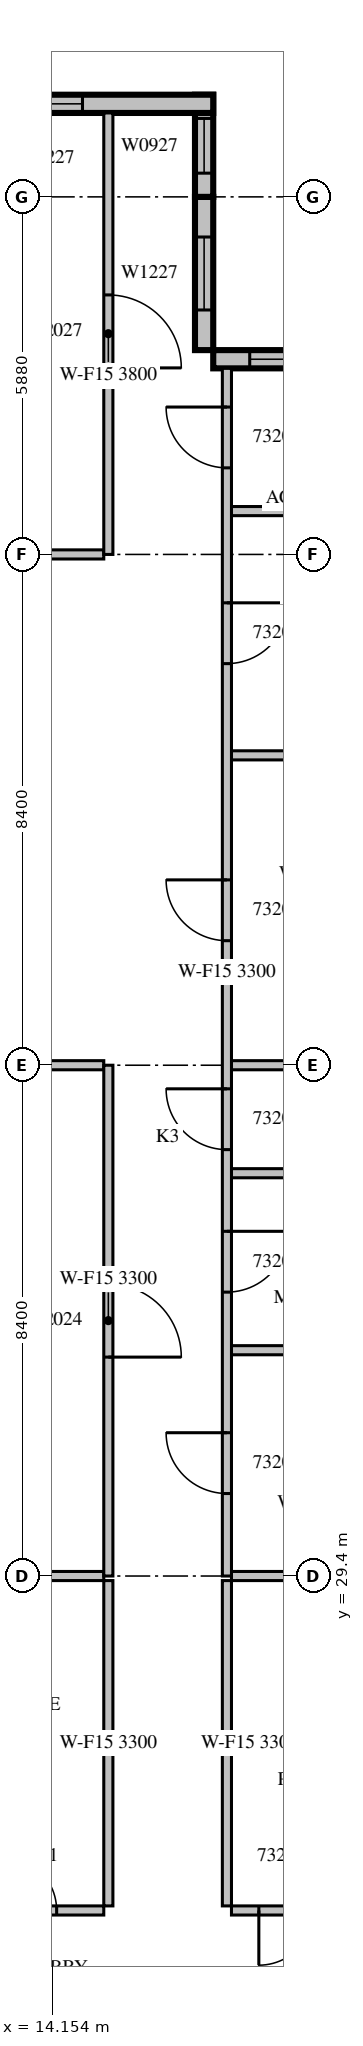
"""IFC4 building model, lengths in metres.
Left out: names, types, materials, properties, quantities, classifications, styles, units other than length and angle.
Written with IfcOpenShell. Run it as: python <this file> out.ifc"""

import sys

from ifc_helpers import new_model, si_unit, direction, frame, frame_2d, origin, place, context, subcontext, project, spatial, rectangle, extrude, source, transform, mapped, element, fill, save


model = new_model("IFC4")
c1 = context("Model", 3, precision=1e-05, world=origin(), true_north=direction((0.0, 1.0)))
c2 = subcontext(c1, "Body", "Model", "MODEL_VIEW")
j1 = project(units=[si_unit("LENGTHUNIT", "METRE"), si_unit("PLANEANGLEUNIT", "RADIAN")], contexts=[c1])
p1 = place(None, origin())
s1 = spatial("IfcSite", under=j1, at=p1, CompositionType="ELEMENT")
p2 = place(p1, origin())
s2 = spatial("IfcBuilding", under=s1, at=p2, CompositionType="ELEMENT")
p3 = place(p2, frame((0.0, 0.0, 145.5)))
s3 = spatial("IfcBuildingStorey", under=s2, at=p3, CompositionType="ELEMENT", Elevation=145.5)
m1 = source(origin(), c2, "Body", "SweptSolid", [
    extrude(rectangle(XDim=4.2, YDim=0.3, at=frame_2d((2.1, 0.0))), origin(), (0.0, 0.0, 1.0), 3.8),
])
p4 = place(p3, frame((21.0, 49.41, 0.0), z_axis=(0.0, 0.0, 1.0), x_axis=(-1.0, 0.0, 0.0)))
e1 = element("IfcWall", 1, at=p4, inside=s3, PredefinedType="STANDARD", context=c2, shape_type="MappedRepresentation", body=[
    mapped(m1, transform((0.0, 0.0, 0.0), scale=1.0)),
])
m2 = source(origin(), c2, "Body", "SweptSolid", [
    extrude(rectangle(XDim=3.0, YDim=2.7, at=frame_2d((1.5, 1.35))), frame((0.0, 0.16, 0.0), z_axis=(0.0, -1.0, 0.0), x_axis=(1.0, 0.0, 0.0)), (0.0, 0.0, 1.0), 0.32),
])
p5 = place(p4, frame((0.6, 0.0, 0.6)))
e2 = element("IfcOpeningElement", 2, at=p5, cuts=e1, PredefinedType="OPENING", context=c2, shape_type="MappedRepresentation", body=[
    mapped(m2, transform((0.0, 0.0, 0.0), scale=1.0)),
])
m3 = source(origin(), c2, "Body", "SweptSolid", [
    extrude(rectangle(XDim=2.52, YDim=0.3, at=frame_2d((1.26, 0.0))), origin(), (0.0, 0.0, 1.0), 3.8),
])
p6 = place(p3, frame((16.65, 49.56, 0.0), z_axis=(0.0, 0.0, 1.0), x_axis=(0.0, 1.0, 0.0)))
e3 = element("IfcWall", 3, at=p6, inside=s3, PredefinedType="STANDARD", context=c2, shape_type="MappedRepresentation", body=[
    mapped(m3, transform((0.0, 0.0, 0.0), scale=1.0)),
])
m4 = source(origin(), c2, "Body", "SweptSolid", [
    extrude(rectangle(XDim=1.2, YDim=2.7, at=frame_2d((0.6, 1.35))), frame((0.0, 0.16, 0.0), z_axis=(0.0, -1.0, 0.0), x_axis=(1.0, 0.0, 0.0)), (0.0, 0.0, 1.0), 0.32),
])
p7 = place(p6, frame((0.66, 0.0, 0.6)))
e4 = element("IfcOpeningElement", 4, at=p7, cuts=e3, PredefinedType="OPENING", context=c2, shape_type="MappedRepresentation", body=[
    mapped(m4, transform((0.0, 0.0, 0.0), scale=1.0)),
])
m5 = source(origin(), c2, "Body", "SweptSolid", [
    extrude(rectangle(XDim=1.68, YDim=0.3, at=frame_2d((0.84, 0.0))), origin(), (0.0, 0.0, 1.0), 3.8),
])
p8 = place(p3, frame((16.65, 52.08, 0.0), z_axis=(0.0, 0.0, 1.0), x_axis=(0.0, 1.0, 0.0)))
e5 = element("IfcWall", 5, at=p8, inside=s3, PredefinedType="STANDARD", context=c2, shape_type="MappedRepresentation", body=[
    mapped(m5, transform((0.0, 0.0, 0.0), scale=1.0)),
])
m6 = source(origin(), c2, "Body", "SweptSolid", [
    extrude(rectangle(XDim=0.9, YDim=2.7, at=frame_2d((0.45, 1.35))), frame((0.0, 0.16, 0.0), z_axis=(0.0, -1.0, 0.0), x_axis=(1.0, 0.0, 0.0)), (0.0, 0.0, 1.0), 0.32),
])
p9 = place(p8, frame((0.39, 0.0, 0.6)))
e6 = element("IfcOpeningElement", 6, at=p9, cuts=e5, PredefinedType="OPENING", context=c2, shape_type="MappedRepresentation", body=[
    mapped(m6, transform((0.0, 0.0, 0.0), scale=1.0)),
])
m7 = source(origin(), c2, "Body", "SweptSolid", [
    extrude(rectangle(XDim=10.5, YDim=0.3, at=frame_2d((5.25, 0.0))), origin(), (0.0, 0.0, 1.0), 3.8),
])
p10 = place(p3, frame((16.8, 53.61, 0.0), z_axis=(0.0, 0.0, 1.0), x_axis=(-1.0, 0.0, 0.0)))
e7 = element("IfcWall", 7, at=p10, inside=s3, PredefinedType="STANDARD", context=c2, shape_type="MappedRepresentation", body=[
    mapped(m7, transform((0.0, 0.0, 0.0), scale=1.0)),
])
p11 = place(p10, frame((2.15, 0.0, 0.6)))
e8 = element("IfcOpeningElement", 8, at=p11, cuts=e7, PredefinedType="OPENING", context=c2, shape_type="MappedRepresentation", body=[
    mapped(m4, transform((0.0, 0.0, 0.0), scale=1.0)),
])
m8 = source(origin(), c2, "Body", "SweptSolid", [
    extrude(rectangle(XDim=1.8, YDim=2.7, at=frame_2d((0.9, 1.35))), frame((0.0, 0.16, 0.0), z_axis=(0.0, -1.0, 0.0), x_axis=(1.0, 0.0, 0.0)), (0.0, 0.0, 1.0), 0.32),
])
p12 = place(p10, frame((8.025, 0.0, 0.6)))
e9 = element("IfcOpeningElement", 9, at=p12, cuts=e7, PredefinedType="OPENING", context=c2, shape_type="MappedRepresentation", body=[
    mapped(m8, transform((0.0, 0.0, 0.0), scale=1.0)),
])
m9 = source(origin(), c2, "Body", "SweptSolid", [
    extrude(rectangle(XDim=8.495, YDim=0.15, at=frame_2d((4.247, 0.0))), origin(), (0.0, 0.0, 1.0), 2.8),
])
p13 = place(p3, frame((6.505, 23.9, 0.0), z_axis=(0.0, 0.0, 1.0), x_axis=(1.0, 0.0, 0.0)))
e10 = element("IfcWall", 10, at=p13, inside=s3, PredefinedType="PARTITIONING", context=c2, shape_type="MappedRepresentation", body=[
    mapped(m9, transform((0.0, 0.0, 0.0), scale=1.0)),
])
m10 = source(origin(), c2, "Body", "SweptSolid", [
    extrude(rectangle(XDim=0.9, YDim=2.1, at=frame_2d((0.45, 1.05))), frame((0.0, 0.085, 0.0), z_axis=(0.0, -1.0, 0.0), x_axis=(1.0, 0.0, 0.0)), (0.0, 0.0, 1.0), 0.17),
])
p14 = place(p13, frame((1.745, 0.0, 0.0)))
e11 = element("IfcOpeningElement", 11, at=p14, cuts=e10, PredefinedType="OPENING", context=c2, shape_type="MappedRepresentation", body=[
    mapped(m10, transform((0.0, 0.0, 0.0), scale=1.0)),
])
p15 = place(p13, frame((6.82, 0.0, 0.0)))
e12 = element("IfcOpeningElement", 12, at=p15, cuts=e10, PredefinedType="OPENING", context=c2, shape_type="MappedRepresentation", body=[
    mapped(m10, transform((0.0, 0.0, 0.0), scale=1.0)),
])
m11 = source(origin(), c2, "Body", "SweptSolid", [
    extrude(rectangle(XDim=3.6, YDim=0.15, at=frame_2d((1.8, 0.0))), origin(), (0.0, 0.0, 1.0), 2.8),
])
p16 = place(p3, frame((17.1, 23.9, 0.0), z_axis=(0.0, 0.0, 1.0), x_axis=(1.0, 0.0, 0.0)))
e13 = element("IfcWall", 13, at=p16, inside=s3, PredefinedType="PARTITIONING", context=c2, shape_type="MappedRepresentation", body=[
    mapped(m11, transform((0.0, 0.0, 0.0), scale=1.0)),
])
p17 = place(p16, frame((0.45, 0.0, 0.0)))
e14 = element("IfcOpeningElement", 14, at=p17, cuts=e13, PredefinedType="OPENING", context=c2, shape_type="MappedRepresentation", body=[
    mapped(m10, transform((0.0, 0.0, 0.0), scale=1.0)),
])
m12 = source(origin(), c2, "Body", "SweptSolid", [
    extrude(rectangle(XDim=5.35, YDim=0.15, at=frame_2d((2.675, 0.0))), origin(), (0.0, 0.0, 1.0), 3.3),
])
for number, where, z_axis, x_axis in (
    (15, (15.075, 23.975, 0.0), (0.0, 0.0, 1.0), (0.0, 1.0, 0.0)),
    (16, (17.025, 29.325, 0.0), (0.0, 0.0, 1.0), (0.0, -1.0, 0.0)),
):
    element("IfcWall", number, at=place(p3, frame(where, z_axis=z_axis, x_axis=x_axis)), inside=s3, PredefinedType="PARTITIONING", context=c2, shape_type="MappedRepresentation", body=[
        mapped(m12, transform((0.0, 0.0, 0.0), scale=1.0)),
    ])
m13 = source(origin(), c2, "Body", "SweptSolid", [
    extrude(rectangle(XDim=3.976, YDim=0.15, at=frame_2d((1.988, 0.0))), origin(), (0.0, 0.0, 1.0), 3.8),
])
p18 = place(p3, frame((15.0, 29.4, 0.0), z_axis=(0.0, 0.0, 1.0), x_axis=(-1.0, 0.0, 0.0)))
e17 = element("IfcWall", 17, at=p18, inside=s3, PredefinedType="PARTITIONING", context=c2, shape_type="MappedRepresentation", body=[
    mapped(m13, transform((0.0, 0.0, 0.0), scale=1.0)),
])
m14 = source(origin(), c2, "Body", "SweptSolid", [
    extrude(rectangle(XDim=2.851, YDim=0.15, at=frame_2d((1.425, 0.0))), origin(), (0.0, 0.0, 1.0), 3.8),
])
p19 = place(p3, frame((19.951, 29.4, 0.0), z_axis=(0.0, 0.0, 1.0), x_axis=(-1.0, 0.0, 0.0)))
e18 = element("IfcWall", 18, at=p19, inside=s3, PredefinedType="PARTITIONING", context=c2, shape_type="MappedRepresentation", body=[
    mapped(m14, transform((0.0, 0.0, 0.0), scale=1.0)),
])
m15 = source(origin(), c2, "Body", "SweptSolid", [
    extrude(rectangle(XDim=3.825, YDim=0.15, at=frame_2d((1.913, 0.0))), origin(), (0.0, 0.0, 1.0), 3.8),
])
for number, where, z_axis, x_axis in (
    (19, (15.0, 37.8, 0.0), (0.0, 0.0, 1.0), (-1.0, 0.0, 0.0)),
    (20, (15.0, 46.2, 0.0), (0.0, 0.0, 1.0), (-1.0, 0.0, 0.0)),
):
    element("IfcWall", number, at=place(p3, frame(where, z_axis=z_axis, x_axis=x_axis)), inside=s3, PredefinedType="PARTITIONING", context=c2, shape_type="MappedRepresentation", body=[
        mapped(m15, transform((0.0, 0.0, 0.0), scale=1.0)),
    ])
for number, where, z_axis, x_axis in (
    (21, (17.1, 33.113, 0.0), (0.0, 0.0, 1.0), (1.0, 0.0, 0.0)),
    (22, (17.1, 36.024, 0.0), (0.0, 0.0, 1.0), (1.0, 0.0, 0.0)),
):
    element("IfcWall", number, at=place(p3, frame(where, z_axis=z_axis, x_axis=x_axis)), inside=s3, PredefinedType="PARTITIONING", context=c2, shape_type="MappedRepresentation", body=[
        mapped(m11, transform((0.0, 0.0, 0.0), scale=1.0)),
    ])
m16 = source(origin(), c2, "Body", "SweptSolid", [
    extrude(rectangle(XDim=3.6, YDim=0.15, at=frame_2d((1.8, 0.0))), origin(), (0.0, 0.0, 1.0), 3.8),
])
for number, where, z_axis, x_axis in (
    (23, (17.1, 42.896, 0.0), (0.0, 0.0, 1.0), (1.0, 0.0, 0.0)),
    (24, (17.1, 46.913, 0.0), (0.0, 0.0, 1.0), (1.0, 0.0, 0.0)),
):
    element("IfcWall", number, at=place(p3, frame(where, z_axis=z_axis, x_axis=x_axis)), inside=s3, PredefinedType="PARTITIONING", context=c2, shape_type="MappedRepresentation", body=[
        mapped(m16, transform((0.0, 0.0, 0.0), scale=1.0)),
    ])
p20 = place(p3, frame((19.951, 37.8, 0.0), z_axis=(0.0, 0.0, 1.0), x_axis=(-1.0, 0.0, 0.0)))
e25 = element("IfcWall", 25, at=p20, inside=s3, PredefinedType="PARTITIONING", context=c2, shape_type="MappedRepresentation", body=[
    mapped(m14, transform((0.0, 0.0, 0.0), scale=1.0)),
])
m17 = source(origin(), c2, "Body", "SweptSolid", [
    extrude(rectangle(XDim=8.4, YDim=0.15, at=frame_2d((4.2, 0.0))), origin(), (0.0, 0.0, 1.0), 3.3),
])
p21 = place(p3, frame((15.075, 29.4, 0.0), z_axis=(0.0, 0.0, 1.0), x_axis=(0.0, 1.0, 0.0)))
e26 = element("IfcWall", 26, at=p21, inside=s3, PredefinedType="PARTITIONING", context=c2, shape_type="MappedRepresentation", body=[
    mapped(m17, transform((0.0, 0.0, 0.0), scale=1.0)),
])
m18 = source(origin(), c2, "Body", "SweptSolid", [
    extrude(rectangle(XDim=1.2, YDim=2.1, at=frame_2d((0.6, 1.05))), frame((0.0, 0.085, 0.0), z_axis=(0.0, -1.0, 0.0), x_axis=(1.0, 0.0, 0.0)), (0.0, 0.0, 1.0), 0.17),
])
p22 = place(p21, frame((3.6, 0.0, 0.0)))
e27 = element("IfcOpeningElement", 27, at=p22, cuts=e26, PredefinedType="OPENING", context=c2, shape_type="MappedRepresentation", body=[
    mapped(m18, transform((0.0, 0.0, 0.0), scale=1.0)),
])
m19 = source(origin(), c2, "Body", "SweptSolid", [
    extrude(rectangle(XDim=7.26, YDim=0.15, at=frame_2d((3.63, 0.0))), origin(), (0.0, 0.0, 1.0), 3.8),
])
p23 = place(p3, frame((15.075, 46.2, 0.0), z_axis=(0.0, 0.0, 1.0), x_axis=(0.0, 1.0, 0.0)))
e28 = element("IfcWall", 28, at=p23, inside=s3, PredefinedType="PARTITIONING", context=c2, shape_type="MappedRepresentation", body=[
    mapped(m19, transform((0.0, 0.0, 0.0), scale=1.0)),
])
p24 = place(p23, frame((3.067, 0.0, 0.0)))
e29 = element("IfcOpeningElement", 29, at=p24, cuts=e28, PredefinedType="OPENING", context=c2, shape_type="MappedRepresentation", body=[
    mapped(m18, transform((0.0, 0.0, 0.0), scale=1.0)),
])
m20 = source(origin(), c2, "Body", "SweptSolid", [
    extrude(rectangle(XDim=19.86, YDim=0.15, at=frame_2d((9.93, 0.0))), origin(), (0.0, 0.0, 1.0), 3.3),
])
p25 = place(p3, frame((17.025, 49.26, 0.0), z_axis=(0.0, 0.0, 1.0), x_axis=(0.0, -1.0, 0.0)))
e30 = element("IfcWall", 30, at=p25, inside=s3, PredefinedType="PARTITIONING", context=c2, shape_type="MappedRepresentation", body=[
    mapped(m20, transform((0.0, 0.0, 0.0), scale=1.0)),
])
m21 = source(origin(), c2, "Body", "SweptSolid", [
    extrude(rectangle(XDim=1.0, YDim=2.1, at=frame_2d((0.5, 1.05))), frame((0.0, 0.085, 0.0), z_axis=(0.0, -1.0, 0.0), x_axis=(1.0, 0.0, 0.0)), (0.0, 0.0, 1.0), 0.17),
])
p26 = place(p25, frame((17.503, 0.0, 0.0)))
e31 = element("IfcOpeningElement", 31, at=p26, cuts=e30, PredefinedType="OPENING", context=c2, shape_type="MappedRepresentation", body=[
    mapped(m21, transform((0.0, 0.0, 0.0), scale=1.0)),
])
p27 = place(p25, frame((14.191, 0.0, 0.0)))
e32 = element("IfcOpeningElement", 32, at=p27, cuts=e30, PredefinedType="OPENING", context=c2, shape_type="MappedRepresentation", body=[
    mapped(m21, transform((0.0, 0.0, 0.0), scale=1.0)),
])
p28 = place(p25, frame((11.848, 0.0, 0.0)))
e33 = element("IfcOpeningElement", 33, at=p28, cuts=e30, PredefinedType="OPENING", context=c2, shape_type="MappedRepresentation", body=[
    mapped(m21, transform((0.0, 0.0, 0.0), scale=1.0)),
])
p29 = place(p25, frame((8.412, 0.0, 0.0)))
e34 = element("IfcOpeningElement", 34, at=p29, cuts=e30, PredefinedType="OPENING", context=c2, shape_type="MappedRepresentation", body=[
    mapped(m21, transform((0.0, 0.0, 0.0), scale=1.0)),
])
p30 = place(p25, frame((3.856, 0.0, 0.0)))
e35 = element("IfcOpeningElement", 35, at=p30, cuts=e30, PredefinedType="OPENING", context=c2, shape_type="MappedRepresentation", body=[
    mapped(m21, transform((0.0, 0.0, 0.0), scale=1.0)),
])
p31 = place(p25, frame((0.636, 0.0, 0.0)))
e36 = element("IfcOpeningElement", 36, at=p31, cuts=e30, PredefinedType="OPENING", context=c2, shape_type="MappedRepresentation", body=[
    mapped(m21, transform((0.0, 0.0, 0.0), scale=1.0)),
])
m22 = source(origin(), c2, "Body", "SweptSolid", [
    extrude(rectangle(XDim=3.0, YDim=2.7, at=frame_2d((1.5, 1.35))), frame((0.0, 0.03, 0.0), z_axis=(0.0, -1.0, 0.0), x_axis=(1.0, 0.0, 0.0)), (0.0, 0.0, 1.0), 0.06),
])
p32 = place(p5, origin())
e37 = element("IfcWindow", 37, at=p32, inside=s3, PartitioningType="SINGLE_PANEL", PredefinedType="WINDOW", context=c2, shape_type="MappedRepresentation", body=[
    mapped(m22, transform((0.0, 0.0, 0.0), scale=1.0)),
])
fill(e2, e37)
m23 = source(origin(), c2, "Body", "SweptSolid", [
    extrude(rectangle(XDim=1.2, YDim=2.7, at=frame_2d((0.6, 1.35))), frame((0.0, 0.03, 0.0), z_axis=(0.0, -1.0, 0.0), x_axis=(1.0, 0.0, 0.0)), (0.0, 0.0, 1.0), 0.06),
])
p33 = place(p7, origin())
e38 = element("IfcWindow", 38, at=p33, inside=s3, PartitioningType="SINGLE_PANEL", PredefinedType="WINDOW", context=c2, shape_type="MappedRepresentation", body=[
    mapped(m23, transform((0.0, 0.0, 0.0), scale=1.0)),
])
fill(e4, e38)
m24 = source(origin(), c2, "Body", "SweptSolid", [
    extrude(rectangle(XDim=0.9, YDim=2.7, at=frame_2d((0.45, 1.35))), frame((0.0, 0.03, 0.0), z_axis=(0.0, -1.0, 0.0), x_axis=(1.0, 0.0, 0.0)), (0.0, 0.0, 1.0), 0.06),
])
p34 = place(p9, origin())
e39 = element("IfcWindow", 39, at=p34, inside=s3, PartitioningType="SINGLE_PANEL", PredefinedType="WINDOW", context=c2, shape_type="MappedRepresentation", body=[
    mapped(m24, transform((0.0, 0.0, 0.0), scale=1.0)),
])
fill(e6, e39)
p35 = place(p11, origin())
e40 = element("IfcWindow", 40, at=p35, inside=s3, PartitioningType="SINGLE_PANEL", PredefinedType="WINDOW", context=c2, shape_type="MappedRepresentation", body=[
    mapped(m23, transform((0.0, 0.0, 0.0), scale=1.0)),
])
fill(e8, e40)
m25 = source(origin(), c2, "Body", "SweptSolid", [
    extrude(rectangle(XDim=0.9, YDim=2.1, at=frame_2d((0.45, 1.05))), frame((0.0, 0.025, 0.0), z_axis=(0.0, -1.0, 0.0), x_axis=(1.0, 0.0, 0.0)), (0.0, 0.0, 1.0), 0.05),
])
p36 = place(p15, origin())
e41 = element("IfcDoor", 41, at=p36, inside=s3, OperationType="SINGLE_SWING_LEFT", PredefinedType="DOOR", context=c2, shape_type="MappedRepresentation", body=[
    mapped(m25, transform((0.0, 0.0, 0.0), scale=1.0)),
])
fill(e12, e41)
p37 = place(p17, origin())
e42 = element("IfcDoor", 42, at=p37, inside=s3, OperationType="SINGLE_SWING_RIGHT", PredefinedType="DOOR", context=c2, shape_type="MappedRepresentation", body=[
    mapped(m25, transform((0.0, 0.0, 0.0), scale=1.0)),
])
fill(e14, e42)
m26 = source(origin(), c2, "Body", "SweptSolid", [
    extrude(rectangle(XDim=1.2, YDim=2.1, at=frame_2d((0.6, 1.05))), frame((0.0, 0.025, 0.0), z_axis=(0.0, -1.0, 0.0), x_axis=(1.0, 0.0, 0.0)), (0.0, 0.0, 1.0), 0.05),
])
p38 = place(p22, origin())
e43 = element("IfcDoor", 43, at=p38, inside=s3, OperationType="SINGLE_SWING_RIGHT", PredefinedType="DOOR", context=c2, shape_type="MappedRepresentation", body=[
    mapped(m26, transform((0.0, 0.0, 0.0), scale=1.0)),
])
fill(e27, e43)
p39 = place(p24, origin())
e44 = element("IfcDoor", 44, at=p39, inside=s3, OperationType="SINGLE_SWING_RIGHT", PredefinedType="DOOR", context=c2, shape_type="MappedRepresentation", body=[
    mapped(m26, transform((0.0, 0.0, 0.0), scale=1.0)),
])
fill(e29, e44)
m27 = source(origin(), c2, "Body", "SweptSolid", [
    extrude(rectangle(XDim=1.0, YDim=2.1, at=frame_2d((0.5, 1.05))), frame((0.0, 0.025, 0.0), z_axis=(0.0, -1.0, 0.0), x_axis=(1.0, 0.0, 0.0)), (0.0, 0.0, 1.0), 0.05),
])
p40 = place(p26, origin())
e45 = element("IfcDoor", 45, at=p40, inside=s3, OperationType="SINGLE_SWING_RIGHT", PredefinedType="DOOR", context=c2, shape_type="MappedRepresentation", body=[
    mapped(m27, transform((0.0, 0.0, 0.0), scale=1.0)),
])
fill(e31, e45)
p41 = place(p27, origin())
e46 = element("IfcDoor", 46, at=p41, inside=s3, OperationType="SINGLE_SWING_LEFT", PredefinedType="DOOR", context=c2, shape_type="MappedRepresentation", body=[
    mapped(m27, transform((0.0, 0.0, 0.0), scale=1.0)),
])
fill(e32, e46)
p42 = place(p28, origin())
e47 = element("IfcDoor", 47, at=p42, inside=s3, OperationType="SINGLE_SWING_RIGHT", PredefinedType="DOOR", context=c2, shape_type="MappedRepresentation", body=[
    mapped(m27, transform((0.0, 0.0, 0.0), scale=1.0)),
])
fill(e33, e47)
p43 = place(p29, origin())
e48 = element("IfcDoor", 48, at=p43, inside=s3, OperationType="SINGLE_SWING_RIGHT", PredefinedType="DOOR", context=c2, shape_type="MappedRepresentation", body=[
    mapped(m27, transform((0.0, 0.0, 0.0), scale=1.0)),
])
fill(e34, e48)
p44 = place(p30, origin())
e49 = element("IfcDoor", 49, at=p44, inside=s3, OperationType="SINGLE_SWING_LEFT", PredefinedType="DOOR", context=c2, shape_type="MappedRepresentation", body=[
    mapped(m27, transform((0.0, 0.0, 0.0), scale=1.0)),
])
fill(e35, e49)
p45 = place(p31, origin())
e50 = element("IfcDoor", 50, at=p45, inside=s3, OperationType="SINGLE_SWING_RIGHT", PredefinedType="DOOR", context=c2, shape_type="MappedRepresentation", body=[
    mapped(m27, transform((0.0, 0.0, 0.0), scale=1.0)),
])
fill(e36, e50)
save(model, sys.argv[1])
